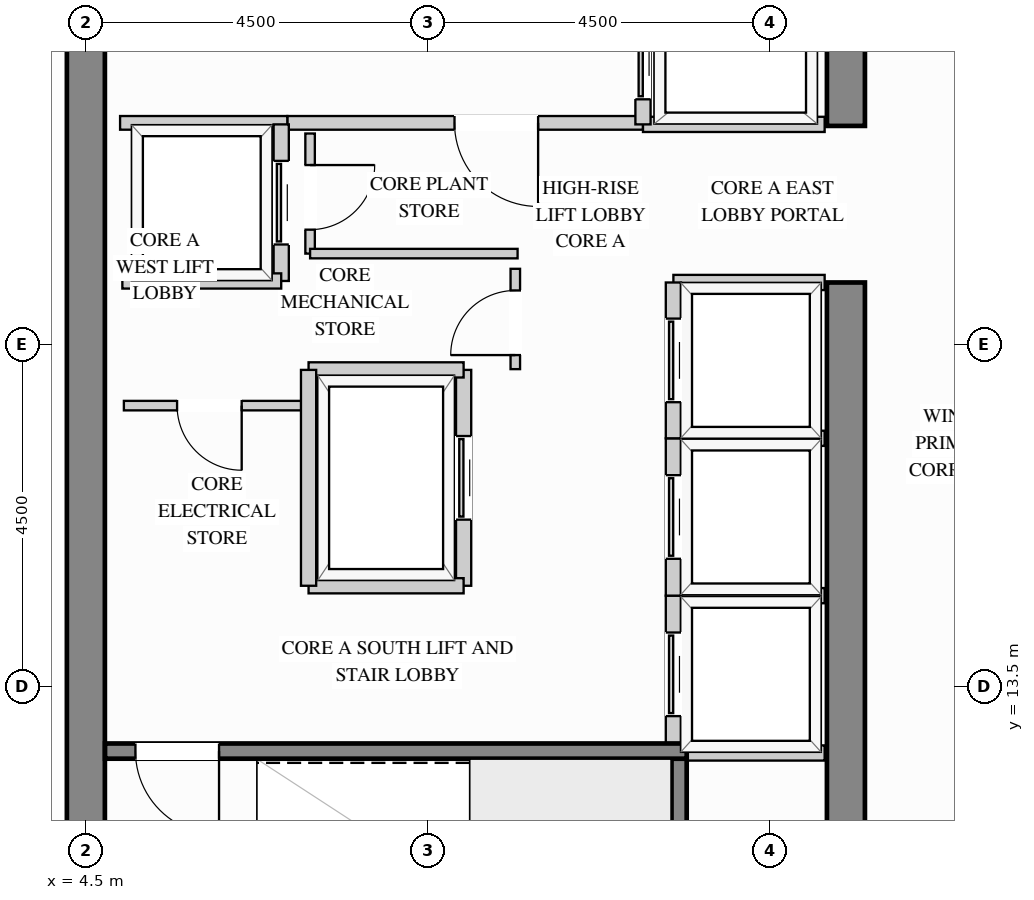
"""IFC4 building model, lengths in metres.
Left out: names, types, materials, properties, quantities, classifications, styles, units other than length and angle.
Written with IfcOpenShell. Run it as: python <this file> out.ifc"""

import sys

from ifc_helpers import new_model, si_unit, direction, frame, frame_2d, origin, place, context, subcontext, project, spatial, rectangle, extrude, source, transform, mapped, element, fill, save


model = new_model("IFC4")
c1 = context("Model", 3, precision=1e-05, world=origin(), true_north=direction((0.0, 1.0)))
c2 = subcontext(c1, "Body", "Model", "MODEL_VIEW")
j1 = project(units=[si_unit("LENGTHUNIT", "METRE"), si_unit("PLANEANGLEUNIT", "RADIAN")], contexts=[c1])
p1 = place(None, origin())
s1 = spatial("IfcSite", under=j1, at=p1, CompositionType="ELEMENT")
p2 = place(p1, origin())
s2 = spatial("IfcBuilding", under=s1, at=p2, CompositionType="ELEMENT")
p3 = place(p2, frame((0.0, 0.0, 252.0)))
s3 = spatial("IfcBuildingStorey", under=s2, at=p3, CompositionType="ELEMENT", Elevation=252.0)
m1 = source(origin(), c2, "Body", "SweptSolid", [
    extrude(rectangle(XDim=10.07, YDim=0.5, at=frame_2d((5.035, 0.0))), origin(), (0.0, 0.0, 1.0), 3.4),
])
p4 = place(p3, frame((14.5, 8.75, 0.0), z_axis=(0.0, 0.0, 1.0), x_axis=(0.0, 1.0, 0.0)))
e1 = element("IfcWall", 1, at=p4, inside=s3, PredefinedType="SHEAR", context=c2, shape_type="MappedRepresentation", body=[
    mapped(m1, transform((0.0, 0.0, 0.0), x_axis=(1.0, 0.0, 0.0), y_axis=(0.0, 1.0, 0.0), z_axis=(0.0, 0.0, 1.0))),
])
m2 = source(origin(), c2, "Body", "SweptSolid", [
    extrude(rectangle(XDim=8.37, YDim=0.5, at=frame_2d((4.185, 0.0))), origin(), (0.0, 0.0, 1.0), 3.4),
])
p5 = place(p3, frame((14.5, 20.88, 0.0), z_axis=(0.0, 0.0, 1.0), x_axis=(0.0, 1.0, 0.0)))
e2 = element("IfcWall", 2, at=p5, inside=s3, PredefinedType="SHEAR", context=c2, shape_type="MappedRepresentation", body=[
    mapped(m2, transform((0.0, 0.0, 0.0), x_axis=(1.0, 0.0, 0.0), y_axis=(0.0, 1.0, 0.0), z_axis=(0.0, 0.0, 1.0))),
])
m3 = source(origin(), c2, "Body", "SweptSolid", [
    extrude(rectangle(XDim=20.5, YDim=0.5, at=frame_2d((10.25, 0.0))), origin(), (0.0, 0.0, 1.0), 3.4),
])
p6 = place(p3, frame((4.5, 8.75, 0.0), z_axis=(0.0, 0.0, 1.0), x_axis=(0.0, 1.0, 0.0)))
e3 = element("IfcWall", 3, at=p6, inside=s3, PredefinedType="SHEAR", context=c2, shape_type="MappedRepresentation", body=[
    mapped(m3, transform((0.0, 0.0, 0.0), x_axis=(1.0, 0.0, 0.0), y_axis=(0.0, 1.0, 0.0), z_axis=(0.0, 0.0, 1.0))),
])
p7 = place(p3, frame((7.15, 20.92, 0.0), z_axis=(0.0, 0.0, 1.0), x_axis=(1.0, 0.0, 0.0)))
e4 = element("IfcWall", 4, at=p7, inside=s3, PredefinedType="PARTITIONING", context=c2, shape_type="SweptSolid", body=[
    extrude(rectangle(XDim=4.68, YDim=0.18, at=frame_2d((2.34, 0.0))), origin(), (0.0, 0.0, 1.0), 3.385),
])
p8 = place(p7, frame((2.2, 0.0, 0.0)))
e5 = element("IfcOpeningElement", 5, at=p8, cuts=e4, PredefinedType="OPENING", context=c2, shape_type="SweptSolid", body=[
    extrude(rectangle(XDim=1.1, YDim=2.15, at=frame_2d((0.55, 1.075))), frame((0.0, 0.1, 0.0), z_axis=(0.0, -1.0, 0.0), x_axis=(1.0, 0.0, 0.0)), (0.0, 0.0, 1.0), 0.2),
])
m4 = source(origin(), c2, "Body", "SweptSolid", [
    extrude(rectangle(XDim=2.2, YDim=0.18, at=frame_2d((1.1, 0.0))), origin(), (0.0, 0.0, 1.0), 3.385),
])
p9 = place(p3, frame((4.95, 20.92, 0.0), z_axis=(0.0, 0.0, 1.0), x_axis=(1.0, 0.0, 0.0)))
e6 = element("IfcWall", 6, at=p9, inside=s3, PredefinedType="PARTITIONING", context=c2, shape_type="MappedRepresentation", body=[
    mapped(m4, transform((0.0, 0.0, 0.0), x_axis=(1.0, 0.0, 0.0), y_axis=(0.0, 1.0, 0.0), z_axis=(0.0, 0.0, 1.0))),
])
p10 = place(p3, frame((10.15, 17.68, 0.0), z_axis=(0.0, 0.0, 1.0), x_axis=(0.0, 1.0, 0.0)))
e7 = element("IfcWall", 7, at=p10, inside=s3, PredefinedType="PARTITIONING", context=c2, shape_type="SweptSolid", body=[
    extrude(rectangle(XDim=1.32, YDim=0.125, at=frame_2d((0.66, 0.0))), origin(), (0.0, 0.0, 1.0), 3.385),
])
p11 = place(p10, frame((0.185, 0.0, 0.0)))
e8 = element("IfcOpeningElement", 8, at=p11, cuts=e7, PredefinedType="OPENING", context=c2, shape_type="SweptSolid", body=[
    extrude(rectangle(XDim=0.85, YDim=2.1, at=frame_2d((0.425, 1.05))), frame((0.0, 0.073, 0.0), z_axis=(0.0, -1.0, 0.0), x_axis=(1.0, 0.0, 0.0)), (0.0, 0.0, 1.0), 0.145),
])
p12 = place(p3, frame((7.45, 19.2, 0.0), z_axis=(0.0, 0.0, 1.0), x_axis=(0.0, 1.0, 0.0)))
e9 = element("IfcWall", 9, at=p12, inside=s3, PredefinedType="PARTITIONING", context=c2, shape_type="SweptSolid", body=[
    extrude(rectangle(XDim=1.58, YDim=0.125, at=frame_2d((0.79, 0.0))), origin(), (0.0, 0.0, 1.0), 3.385),
])
p13 = place(p12, frame((0.315, 0.0, 0.0)))
e10 = element("IfcOpeningElement", 10, at=p13, cuts=e9, PredefinedType="OPENING", context=c2, shape_type="SweptSolid", body=[
    extrude(rectangle(XDim=0.85, YDim=2.1, at=frame_2d((0.425, 1.05))), frame((0.0, 0.073, 0.0), z_axis=(0.0, -1.0, 0.0), x_axis=(1.0, 0.0, 0.0)), (0.0, 0.0, 1.0), 0.145),
])
m5 = source(origin(), c2, "Body", "SweptSolid", [
    extrude(rectangle(XDim=2.73, YDim=0.125, at=frame_2d((1.365, 0.0))), origin(), (0.0, 0.0, 1.0), 3.385),
])
p14 = place(p3, frame((7.45, 19.2, 0.0), z_axis=(0.0, 0.0, 1.0), x_axis=(1.0, 0.0, 0.0)))
e11 = element("IfcWall", 11, at=p14, inside=s3, PredefinedType="PARTITIONING", context=c2, shape_type="MappedRepresentation", body=[
    mapped(m5, transform((0.0, 0.0, 0.0), x_axis=(1.0, 0.0, 0.0), y_axis=(0.0, 1.0, 0.0), z_axis=(0.0, 0.0, 1.0))),
])
p15 = place(p3, frame((5.0, 17.2, 0.0), z_axis=(0.0, 0.0, 1.0), x_axis=(1.0, 0.0, 0.0)))
e12 = element("IfcWall", 12, at=p15, inside=s3, PredefinedType="PARTITIONING", context=c2, shape_type="SweptSolid", body=[
    extrude(rectangle(XDim=2.4, YDim=0.125, at=frame_2d((1.2, 0.0))), origin(), (0.0, 0.0, 1.0), 3.385),
])
p16 = place(p15, frame((0.7, 0.0, 0.0)))
e13 = element("IfcOpeningElement", 13, at=p16, cuts=e12, PredefinedType="OPENING", context=c2, shape_type="SweptSolid", body=[
    extrude(rectangle(XDim=0.85, YDim=2.1, at=frame_2d((0.425, 1.05))), frame((0.0, 0.073, 0.0), z_axis=(0.0, -1.0, 0.0), x_axis=(1.0, 0.0, 0.0)), (0.0, 0.0, 1.0), 0.145),
])
m6 = source(origin(), c2, "Body", "SweptSolid", [
    extrude(rectangle(XDim=2.39, YDim=0.2, at=frame_2d((1.195, 0.0))), origin(), (0.0, 0.0, 1.0), 3.385),
])
p17 = place(p3, frame((11.83, 20.9, 0.0), z_axis=(0.0, 0.0, 1.0), x_axis=(1.0, 0.0, 0.0)))
e14 = element("IfcWall", 14, at=p17, inside=s3, PredefinedType="PARTITIONING", context=c2, shape_type="MappedRepresentation", body=[
    mapped(m6, transform((0.0, 0.0, 0.0), x_axis=(1.0, 0.0, 0.0), y_axis=(0.0, 1.0, 0.0), z_axis=(0.0, 0.0, 1.0))),
])
p18 = place(p3, frame((11.83, 20.9, 0.0), z_axis=(0.0, 0.0, 1.0), x_axis=(0.0, 1.0, 0.0)))
e15 = element("IfcWall", 15, at=p18, inside=s3, PredefinedType="PARTITIONING", context=c2, shape_type="SweptSolid", body=[
    extrude(rectangle(XDim=1.76, YDim=0.2, at=frame_2d((0.88, 0.0))), origin(), (0.0, 0.0, 1.0), 3.385),
])
p19 = place(p18, frame((0.33, 0.0, 0.0)))
e16 = element("IfcOpeningElement", 16, at=p19, cuts=e15, PredefinedType="OPENING", context=c2, shape_type="SweptSolid", body=[
    extrude(rectangle(XDim=1.1, YDim=2.2, at=frame_2d((0.55, 1.1))), frame((0.0, 0.11, 0.0), z_axis=(0.0, -1.0, 0.0), x_axis=(1.0, 0.0, 0.0)), (0.0, 0.0, 1.0), 0.22),
])
m7 = source(origin(), c2, "Body", "SweptSolid", [
    extrude(rectangle(XDim=1.99, YDim=0.2, at=frame_2d((0.995, 0.0))), origin(), (0.0, 0.0, 1.0), 3.385),
])
for number, where, z_axis, x_axis in (
    (17, (12.23, 14.7, 0.0), (0.0, 0.0, 1.0), (1.0, 0.0, 0.0)),
    (18, (12.23, 12.63, 0.0), (0.0, 0.0, 1.0), (1.0, 0.0, 0.0)),
):
    element("IfcWall", number, at=place(p3, frame(where, z_axis=z_axis, x_axis=x_axis)), inside=s3, PredefinedType="PARTITIONING", context=c2, shape_type="MappedRepresentation", body=[
        mapped(m7, transform((0.0, 0.0, 0.0), x_axis=(1.0, 0.0, 0.0), y_axis=(0.0, 1.0, 0.0), z_axis=(0.0, 0.0, 1.0))),
    ])
p20 = place(p3, frame((12.23, 12.63, 0.0), z_axis=(0.0, 0.0, 1.0), x_axis=(0.0, 1.0, 0.0)))
e19 = element("IfcWall", 19, at=p20, inside=s3, PredefinedType="PARTITIONING", context=c2, shape_type="SweptSolid", body=[
    extrude(rectangle(XDim=2.07, YDim=0.2, at=frame_2d((1.035, 0.0))), origin(), (0.0, 0.0, 1.0), 3.385),
])
p21 = place(p20, frame((0.485, 0.0, 0.0)))
e20 = element("IfcOpeningElement", 20, at=p21, cuts=e19, PredefinedType="OPENING", context=c2, shape_type="SweptSolid", body=[
    extrude(rectangle(XDim=1.1, YDim=2.2, at=frame_2d((0.55, 1.1))), frame((0.0, 0.11, 0.0), z_axis=(0.0, -1.0, 0.0), x_axis=(1.0, 0.0, 0.0)), (0.0, 0.0, 1.0), 0.22),
])
p22 = place(p3, frame((12.23, 16.77, 0.0), z_axis=(0.0, 0.0, 1.0), x_axis=(1.0, 0.0, 0.0)))
e21 = element("IfcWall", 21, at=p22, inside=s3, PredefinedType="PARTITIONING", context=c2, shape_type="MappedRepresentation", body=[
    mapped(m7, transform((0.0, 0.0, 0.0), x_axis=(1.0, 0.0, 0.0), y_axis=(0.0, 1.0, 0.0), z_axis=(0.0, 0.0, 1.0))),
])
p23 = place(p3, frame((12.23, 14.7, 0.0), z_axis=(0.0, 0.0, 1.0), x_axis=(0.0, 1.0, 0.0)))
e22 = element("IfcWall", 22, at=p23, inside=s3, PredefinedType="PARTITIONING", context=c2, shape_type="SweptSolid", body=[
    extrude(rectangle(XDim=2.07, YDim=0.2, at=frame_2d((1.035, 0.0))), origin(), (0.0, 0.0, 1.0), 3.385),
])
p24 = place(p23, frame((0.485, 0.0, 0.0)))
e23 = element("IfcOpeningElement", 23, at=p24, cuts=e22, PredefinedType="OPENING", context=c2, shape_type="SweptSolid", body=[
    extrude(rectangle(XDim=1.1, YDim=2.2, at=frame_2d((0.55, 1.1))), frame((0.0, 0.11, 0.0), z_axis=(0.0, -1.0, 0.0), x_axis=(1.0, 0.0, 0.0)), (0.0, 0.0, 1.0), 0.22),
])
p25 = place(p3, frame((12.23, 18.82, 0.0), z_axis=(0.0, 0.0, 1.0), x_axis=(1.0, 0.0, 0.0)))
e24 = element("IfcWall", 24, at=p25, inside=s3, PredefinedType="PARTITIONING", context=c2, shape_type="MappedRepresentation", body=[
    mapped(m7, transform((0.0, 0.0, 0.0), x_axis=(1.0, 0.0, 0.0), y_axis=(0.0, 1.0, 0.0), z_axis=(0.0, 0.0, 1.0))),
])
p26 = place(p3, frame((12.23, 16.77, 0.0), z_axis=(0.0, 0.0, 1.0), x_axis=(0.0, 1.0, 0.0)))
e25 = element("IfcWall", 25, at=p26, inside=s3, PredefinedType="PARTITIONING", context=c2, shape_type="SweptSolid", body=[
    extrude(rectangle(XDim=2.05, YDim=0.2, at=frame_2d((1.025, 0.0))), origin(), (0.0, 0.0, 1.0), 3.385),
])
p27 = place(p26, frame((0.475, 0.0, 0.0)))
e26 = element("IfcOpeningElement", 26, at=p27, cuts=e25, PredefinedType="OPENING", context=c2, shape_type="SweptSolid", body=[
    extrude(rectangle(XDim=1.1, YDim=2.2, at=frame_2d((0.55, 1.1))), frame((0.0, 0.11, 0.0), z_axis=(0.0, -1.0, 0.0), x_axis=(1.0, 0.0, 0.0)), (0.0, 0.0, 1.0), 0.22),
])
p28 = place(p3, frame((7.07, 18.84, 0.0), z_axis=(0.0, 0.0, 1.0), x_axis=(0.0, 1.0, 0.0)))
e27 = element("IfcWall", 27, at=p28, inside=s3, PredefinedType="PARTITIONING", context=c2, shape_type="SweptSolid", body=[
    extrude(rectangle(XDim=2.06, YDim=0.2, at=frame_2d((1.03, 0.0))), origin(), (0.0, 0.0, 1.0), 3.385),
])
p29 = place(p28, frame((0.48, 0.0, 0.0)))
e28 = element("IfcOpeningElement", 28, at=p29, cuts=e27, PredefinedType="OPENING", context=c2, shape_type="SweptSolid", body=[
    extrude(rectangle(XDim=1.1, YDim=2.2, at=frame_2d((0.55, 1.1))), frame((0.0, 0.11, 0.0), z_axis=(0.0, -1.0, 0.0), x_axis=(1.0, 0.0, 0.0)), (0.0, 0.0, 1.0), 0.22),
])
m8 = source(origin(), c2, "Body", "SweptSolid", [
    extrude(rectangle(XDim=2.09, YDim=0.2, at=frame_2d((1.045, 0.0))), origin(), (0.0, 0.0, 1.0), 3.385),
])
p30 = place(p3, frame((4.98, 18.84, 0.0), z_axis=(0.0, 0.0, 1.0), x_axis=(1.0, 0.0, 0.0)))
e29 = element("IfcWall", 29, at=p30, inside=s3, PredefinedType="PARTITIONING", context=c2, shape_type="MappedRepresentation", body=[
    mapped(m8, transform((0.0, 0.0, 0.0), x_axis=(1.0, 0.0, 0.0), y_axis=(0.0, 1.0, 0.0), z_axis=(0.0, 0.0, 1.0))),
])
p31 = place(p3, frame((9.47, 14.83, 0.0), z_axis=(0.0, 0.0, 1.0), x_axis=(0.0, 1.0, 0.0)))
e30 = element("IfcWall", 30, at=p31, inside=s3, PredefinedType="PARTITIONING", context=c2, shape_type="SweptSolid", body=[
    extrude(rectangle(XDim=2.84, YDim=0.2, at=frame_2d((1.42, 0.0))), origin(), (0.0, 0.0, 1.0), 3.385),
])
p32 = place(p31, frame((0.87, 0.0, 0.0)))
e31 = element("IfcOpeningElement", 31, at=p32, cuts=e30, PredefinedType="OPENING", context=c2, shape_type="SweptSolid", body=[
    extrude(rectangle(XDim=1.1, YDim=2.2, at=frame_2d((0.55, 1.1))), frame((0.0, 0.11, 0.0), z_axis=(0.0, -1.0, 0.0), x_axis=(1.0, 0.0, 0.0)), (0.0, 0.0, 1.0), 0.22),
])
m9 = source(origin(), c2, "Body", "SweptSolid", [
    extrude(rectangle(XDim=2.04, YDim=0.2, at=frame_2d((1.02, 0.0))), origin(), (0.0, 0.0, 1.0), 3.385),
])
for number, where, z_axis, x_axis in (
    (32, (7.43, 17.67, 0.0), (0.0, 0.0, 1.0), (1.0, 0.0, 0.0)),
    (33, (7.43, 14.83, 0.0), (0.0, 0.0, 1.0), (1.0, 0.0, 0.0)),
):
    element("IfcWall", number, at=place(p3, frame(where, z_axis=z_axis, x_axis=x_axis)), inside=s3, PredefinedType="PARTITIONING", context=c2, shape_type="MappedRepresentation", body=[
        mapped(m9, transform((0.0, 0.0, 0.0), x_axis=(1.0, 0.0, 0.0), y_axis=(0.0, 1.0, 0.0), z_axis=(0.0, 0.0, 1.0))),
    ])
m10 = source(origin(), c2, "Body", "SweptSolid", [
    extrude(rectangle(XDim=2.84, YDim=0.2, at=frame_2d((1.42, 0.0))), origin(), (0.0, 0.0, 1.0), 3.385),
])
p33 = place(p3, frame((7.43, 14.83, 0.0), z_axis=(0.0, 0.0, 1.0), x_axis=(0.0, 1.0, 0.0)))
e34 = element("IfcWall", 34, at=p33, inside=s3, PredefinedType="PARTITIONING", context=c2, shape_type="MappedRepresentation", body=[
    mapped(m10, transform((0.0, 0.0, 0.0), x_axis=(1.0, 0.0, 0.0), y_axis=(0.0, 1.0, 0.0), z_axis=(0.0, 0.0, 1.0))),
])
m11 = source(origin(), c2, "Body", "SweptSolid", [
    extrude(rectangle(XDim=3.803, YDim=0.2, at=frame_2d((1.901, 0.0))), origin(), (0.0, 0.0, 1.0), 3.4),
])
p34 = place(p3, frame((12.305, 8.752, 0.0), z_axis=(0.0, 0.0, 1.0), x_axis=(0.0, 1.0, 0.0)))
e35 = element("IfcWall", 35, at=p34, inside=s3, PredefinedType="SHEAR", context=c2, shape_type="MappedRepresentation", body=[
    mapped(m11, transform((0.0, 0.0, 0.0), x_axis=(1.0, 0.0, 0.0), y_axis=(0.0, 1.0, 0.0), z_axis=(0.0, 0.0, 1.0))),
])
p35 = place(p3, frame((4.752, 12.655, 0.0), z_axis=(0.0, 0.0, 1.0), x_axis=(1.0, 0.0, 0.0)))
e36 = element("IfcWall", 36, at=p35, inside=s3, PredefinedType="SHEAR", context=c2, shape_type="SweptSolid", body=[
    extrude(rectangle(XDim=7.653, YDim=0.2, at=frame_2d((3.827, 0.0))), origin(), (0.0, 0.0, 1.0), 3.4),
])
p36 = place(p35, frame((0.4, 0.0, 0.0)))
e37 = element("IfcOpeningElement", 37, at=p36, cuts=e36, PredefinedType="OPENING", context=c2, shape_type="SweptSolid", body=[
    extrude(rectangle(XDim=1.1, YDim=2.15, at=frame_2d((0.55, 1.075))), frame((0.0, 0.11, 0.0), z_axis=(0.0, -1.0, 0.0), x_axis=(1.0, 0.0, 0.0)), (0.0, 0.0, 1.0), 0.22),
])
m12 = source(origin(), c2, "Body", "SweptSolid", [
    extrude(rectangle(XDim=1.1, YDim=2.15, at=frame_2d((0.55, 1.075))), frame((0.0, 0.025, 0.0), z_axis=(0.0, -1.0, 0.0), x_axis=(1.0, 0.0, 0.0)), (0.0, 0.0, 1.0), 0.05),
])
p37 = place(p8, origin())
e38 = element("IfcDoor", 38, at=p37, inside=s3, OperationType="SINGLE_SWING_RIGHT", PredefinedType="DOOR", context=c2, shape_type="MappedRepresentation", body=[
    mapped(m12, transform((0.0, 0.0, 0.0), x_axis=(1.0, 0.0, 0.0), y_axis=(0.0, 1.0, 0.0), z_axis=(0.0, 0.0, 1.0))),
])
fill(e5, e38)
m13 = source(origin(), c2, "Body", "SweptSolid", [
    extrude(rectangle(XDim=1.1, YDim=2.2, at=frame_2d((0.55, 1.1))), frame((0.0, 0.025, 0.0), z_axis=(0.0, -1.0, 0.0), x_axis=(1.0, 0.0, 0.0)), (0.0, 0.0, 1.0), 0.05),
])
p38 = place(p19, origin())
e39 = element("IfcDoor", 39, at=p38, inside=s3, OperationType="SLIDING_TO_LEFT", PredefinedType="DOOR", context=c2, shape_type="MappedRepresentation", body=[
    mapped(m13, transform((0.0, 0.0, 0.0), x_axis=(1.0, 0.0, 0.0), y_axis=(0.0, 1.0, 0.0), z_axis=(0.0, 0.0, 1.0))),
])
fill(e16, e39)
p39 = place(p21, origin())
e40 = element("IfcDoor", 40, at=p39, inside=s3, OperationType="SLIDING_TO_LEFT", PredefinedType="DOOR", context=c2, shape_type="MappedRepresentation", body=[
    mapped(m13, transform((0.0, 0.0, 0.0), x_axis=(1.0, 0.0, 0.0), y_axis=(0.0, 1.0, 0.0), z_axis=(0.0, 0.0, 1.0))),
])
fill(e20, e40)
p40 = place(p24, origin())
e41 = element("IfcDoor", 41, at=p40, inside=s3, OperationType="SLIDING_TO_LEFT", PredefinedType="DOOR", context=c2, shape_type="MappedRepresentation", body=[
    mapped(m13, transform((0.0, 0.0, 0.0), x_axis=(1.0, 0.0, 0.0), y_axis=(0.0, 1.0, 0.0), z_axis=(0.0, 0.0, 1.0))),
])
fill(e23, e41)
p41 = place(p27, origin())
e42 = element("IfcDoor", 42, at=p41, inside=s3, OperationType="SLIDING_TO_LEFT", PredefinedType="DOOR", context=c2, shape_type="MappedRepresentation", body=[
    mapped(m13, transform((0.0, 0.0, 0.0), x_axis=(1.0, 0.0, 0.0), y_axis=(0.0, 1.0, 0.0), z_axis=(0.0, 0.0, 1.0))),
])
fill(e26, e42)
p42 = place(p29, origin())
e43 = element("IfcDoor", 43, at=p42, inside=s3, OperationType="SLIDING_TO_LEFT", PredefinedType="DOOR", context=c2, shape_type="MappedRepresentation", body=[
    mapped(m13, transform((0.0, 0.0, 0.0), x_axis=(1.0, 0.0, 0.0), y_axis=(0.0, 1.0, 0.0), z_axis=(0.0, 0.0, 1.0))),
])
fill(e28, e43)
p43 = place(p32, origin())
e44 = element("IfcDoor", 44, at=p43, inside=s3, OperationType="SLIDING_TO_LEFT", PredefinedType="DOOR", context=c2, shape_type="MappedRepresentation", body=[
    mapped(m13, transform((0.0, 0.0, 0.0), x_axis=(1.0, 0.0, 0.0), y_axis=(0.0, 1.0, 0.0), z_axis=(0.0, 0.0, 1.0))),
])
fill(e31, e44)
m14 = source(origin(), c2, "Body", "SweptSolid", [
    extrude(rectangle(XDim=0.85, YDim=2.1, at=frame_2d((0.425, 1.05))), frame((0.0, 0.025, 0.0), z_axis=(0.0, -1.0, 0.0), x_axis=(1.0, 0.0, 0.0)), (0.0, 0.0, 1.0), 0.05),
])
p44 = place(p11, origin())
e45 = element("IfcDoor", 45, at=p44, inside=s3, OperationType="SINGLE_SWING_LEFT", PredefinedType="DOOR", context=c2, shape_type="MappedRepresentation", body=[
    mapped(m14, transform((0.0, 0.0, 0.0), x_axis=(1.0, 0.0, 0.0), y_axis=(0.0, 1.0, 0.0), z_axis=(0.0, 0.0, 1.0))),
])
fill(e8, e45)
p45 = place(p16, origin())
e46 = element("IfcDoor", 46, at=p45, inside=s3, OperationType="SINGLE_SWING_RIGHT", PredefinedType="DOOR", context=c2, shape_type="MappedRepresentation", body=[
    mapped(m14, transform((0.0, 0.0, 0.0), x_axis=(1.0, 0.0, 0.0), y_axis=(0.0, 1.0, 0.0), z_axis=(0.0, 0.0, 1.0))),
])
fill(e13, e46)
p46 = place(p13, origin())
e47 = element("IfcDoor", 47, at=p46, inside=s3, OperationType="SINGLE_SWING_RIGHT", PredefinedType="DOOR", context=c2, shape_type="MappedRepresentation", body=[
    mapped(m14, transform((0.0, 0.0, 0.0), x_axis=(1.0, 0.0, 0.0), y_axis=(0.0, 1.0, 0.0), z_axis=(0.0, 0.0, 1.0))),
])
fill(e10, e47)
m15 = source(origin(), c2, "Body", "SweptSolid", [
    extrude(rectangle(XDim=1.1, YDim=2.15, at=frame_2d((0.55, 1.075))), frame((0.0, 0.025, 0.0), z_axis=(0.0, -1.0, 0.0), x_axis=(1.0, 0.0, 0.0)), (0.0, 0.0, 1.0), 0.05),
])
p47 = place(p36, origin())
e48 = element("IfcDoor", 48, at=p47, inside=s3, OperationType="SINGLE_SWING_RIGHT", PredefinedType="DOOR", context=c2, shape_type="MappedRepresentation", body=[
    mapped(m15, transform((0.0, 0.0, 0.0), x_axis=(1.0, 0.0, 0.0), y_axis=(0.0, 1.0, 0.0), z_axis=(0.0, 0.0, 1.0))),
])
fill(e37, e48)
save(model, sys.argv[1])
